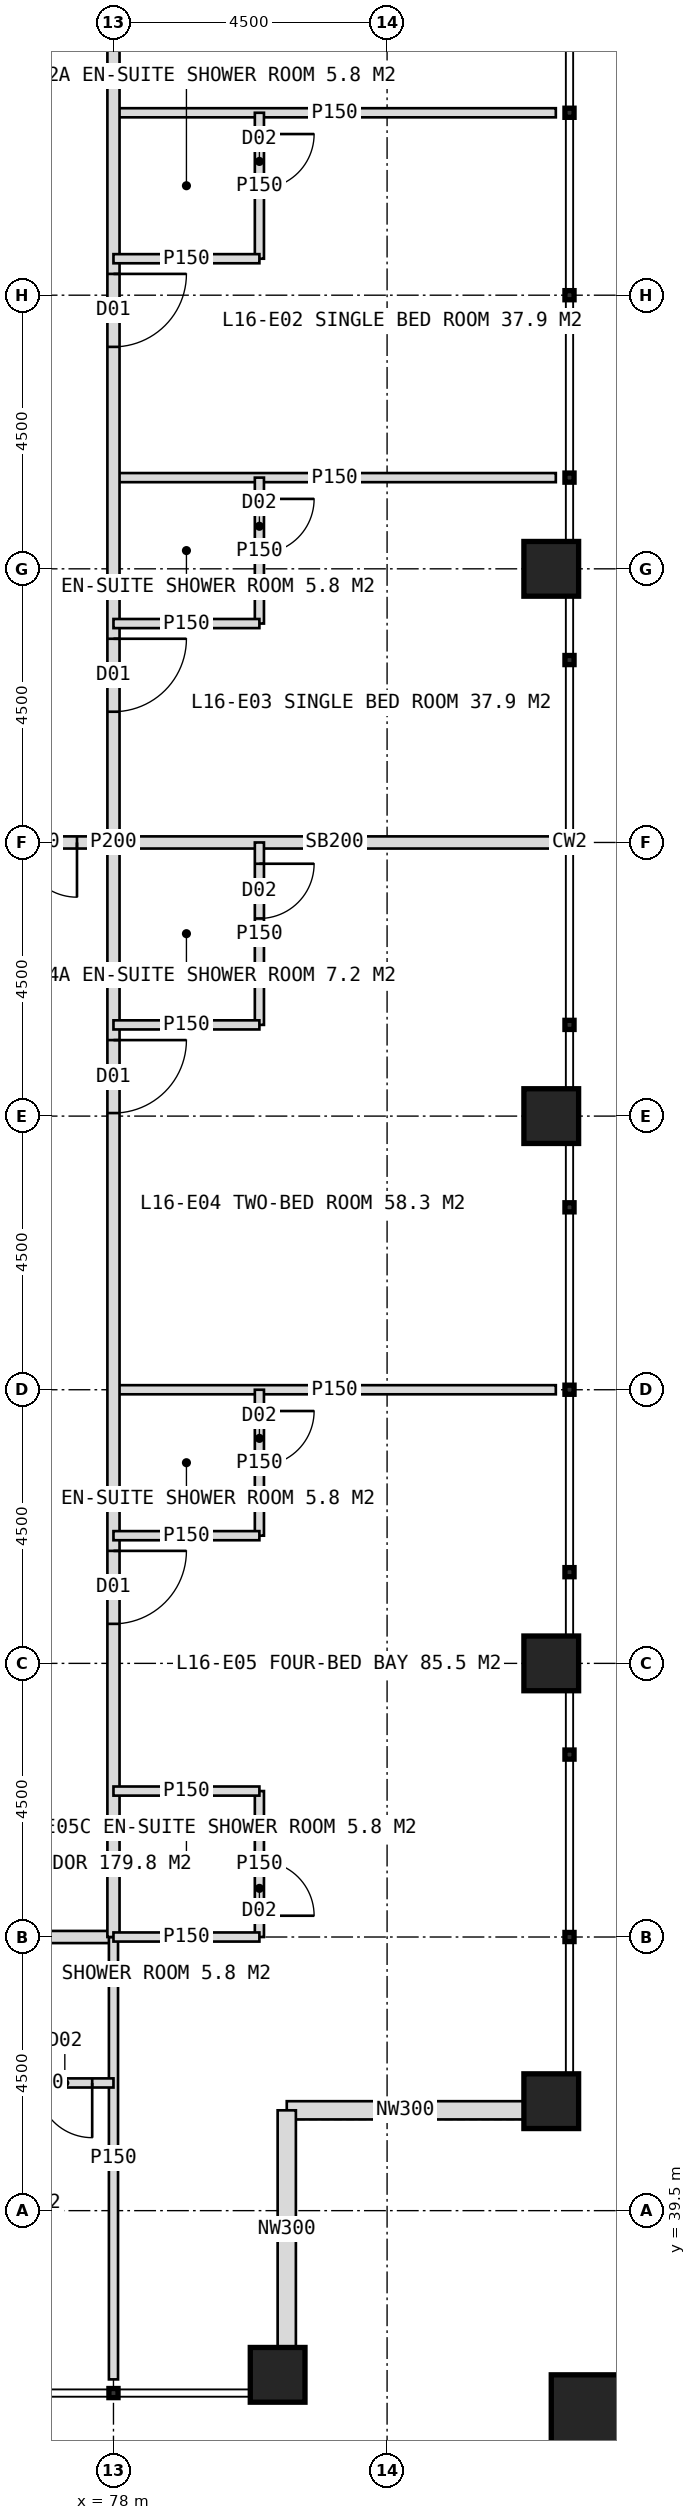
"""IFC4 building model, lengths in metres.
Left out: names, types, materials, properties, quantities, classifications, styles, units other than length and angle.
Written with IfcOpenShell. Run it as: python <this file> out.ifc"""

import sys

from ifc_helpers import new_model, si_unit, direction, frame, frame_2d, origin, origin_2d, place, context, subcontext, project, spatial, rectangle, hollow_rectangle, extrude, element, fill, save


model = new_model("IFC4")
c1 = context("Model", 3, precision=1e-05, world=origin(), true_north=direction((0.0, 1.0)))
c2 = subcontext(c1, "Body", "Model", "MODEL_VIEW")
j1 = project(units=[si_unit("LENGTHUNIT", "METRE"), si_unit("PLANEANGLEUNIT", "RADIAN")], contexts=[c1])
p1 = place(None, origin())
s1 = spatial("IfcSite", under=j1, at=p1, CompositionType="ELEMENT")
p2 = place(p1, origin())
s2 = spatial("IfcBuilding", under=s1, at=p2, CompositionType="ELEMENT")
p3 = place(p2, frame((0.0, 0.0, 71.0)))
s3 = spatial("IfcBuildingStorey", under=s2, at=p3, CompositionType="ELEMENT", Elevation=71.0)
for number, where, z_axis, x_axis in (
    (1, (85.2, 41.3, 0.0), (0.0, 0.0, 1.0), (1.0, 0.0, 0.0)),
    (2, (85.2, 48.5, 0.0), (0.0, 0.0, 1.0), (1.0, 0.0, 0.0)),
    (3, (85.2, 57.5, 0.0), (0.0, 0.0, 1.0), (1.0, 0.0, 0.0)),
    (4, (85.2, 66.5, 0.0), (0.0, 0.0, 1.0), (1.0, 0.0, 0.0)),
    (5, (80.7, 36.8, 0.0), (0.0, 0.0, 1.0), (1.0, 0.0, 0.0)),
):
    element("IfcColumn", number, at=place(p3, frame(where, z_axis=z_axis, x_axis=x_axis)), inside=s3, PredefinedType="COLUMN", context=c2, shape_type="SweptSolid", body=[
        extrude(hollow_rectangle(XDim=0.9, YDim=0.9, WallThickness=0.08, at=origin_2d()), origin(), (0.0, 0.0, 1.0), 4.0),
    ])
p4 = place(p3, frame((86.1, 35.9, 0.0), z_axis=(0.0, 0.0, 1.0), x_axis=(1.0, 0.0, 0.0)))
e6 = element("IfcColumn", 6, at=p4, inside=s3, PredefinedType="COLUMN", context=c2, shape_type="SweptSolid", body=[
    extrude(hollow_rectangle(XDim=1.8, YDim=1.8, WallThickness=0.1, at=origin_2d()), origin(), (0.0, 0.0, 1.0), 4.0),
])
for number, where, z_axis, x_axis in (
    (7, (84.75, 41.15, 0.0), (0.0, 0.0, 1.0), (-1.0, 0.0, 0.0)),
    (8, (80.85, 41.15, 0.0), (0.0, 0.0, 1.0), (0.0, -1.0, 0.0)),
):
    element("IfcWall", number, at=place(p3, frame(where, z_axis=z_axis, x_axis=x_axis)), inside=s3, PredefinedType="ELEMENTEDWALL", context=c2, shape_type="SweptSolid", body=[
        extrude(rectangle(XDim=3.9, YDim=0.3, at=frame_2d((1.95, 0.0))), origin(), (0.0, 0.0, 1.0), 2.95),
    ])
p5 = place(p3, frame((78.0, 44.0, 0.0), z_axis=(0.0, 0.0, 1.0), x_axis=(-1.0, 0.0, 0.0)))
e9 = element("IfcWall", 9, at=p5, inside=s3, PredefinedType="PARTITIONING", context=c2, shape_type="SweptSolid", body=[
    extrude(rectangle(XDim=36.0, YDim=0.2, at=frame_2d((18.0, 0.0))), origin(), (0.0, 0.0, 1.0), 3.75),
])
p6 = place(p5, frame((2.65, 0.0, 0.0)))
e10 = element("IfcOpeningElement", 10, at=p6, cuts=e9, PredefinedType="OPENING", context=c2, shape_type="SweptSolid", body=[
    extrude(rectangle(XDim=1.2, YDim=2.2, at=frame_2d((0.6, 1.1))), frame((0.0, 0.11, 0.0), z_axis=(0.0, -1.0, 0.0), x_axis=(1.0, 0.0, 0.0)), (0.0, 0.0, 1.0), 0.22),
])
p7 = place(p5, frame((8.65, 0.0, 0.0)))
e11 = element("IfcOpeningElement", 11, at=p7, cuts=e9, PredefinedType="OPENING", context=c2, shape_type="SweptSolid", body=[
    extrude(rectangle(XDim=1.2, YDim=2.2, at=frame_2d((0.6, 1.1))), frame((0.0, 0.11, 0.0), z_axis=(0.0, -1.0, 0.0), x_axis=(1.0, 0.0, 0.0)), (0.0, 0.0, 1.0), 0.22),
])
p8 = place(p5, frame((14.65, 0.0, 0.0)))
e12 = element("IfcOpeningElement", 12, at=p8, cuts=e9, PredefinedType="OPENING", context=c2, shape_type="SweptSolid", body=[
    extrude(rectangle(XDim=1.2, YDim=2.2, at=frame_2d((0.6, 1.1))), frame((0.0, 0.11, 0.0), z_axis=(0.0, -1.0, 0.0), x_axis=(1.0, 0.0, 0.0)), (0.0, 0.0, 1.0), 0.22),
])
p9 = place(p5, frame((21.25, 0.0, 0.0)))
e13 = element("IfcOpeningElement", 13, at=p9, cuts=e9, PredefinedType="OPENING", context=c2, shape_type="SweptSolid", body=[
    extrude(rectangle(XDim=1.2, YDim=2.2, at=frame_2d((0.6, 1.1))), frame((0.0, 0.11, 0.0), z_axis=(0.0, -1.0, 0.0), x_axis=(1.0, 0.0, 0.0)), (0.0, 0.0, 1.0), 0.22),
])
p10 = place(p5, frame((29.65, 0.0, 0.0)))
e14 = element("IfcOpeningElement", 14, at=p10, cuts=e9, PredefinedType="OPENING", context=c2, shape_type="SweptSolid", body=[
    extrude(rectangle(XDim=1.2, YDim=2.2, at=frame_2d((0.6, 1.1))), frame((0.0, 0.11, 0.0), z_axis=(0.0, -1.0, 0.0), x_axis=(1.0, 0.0, 0.0)), (0.0, 0.0, 1.0), 0.22),
])
p11 = place(p3, frame((78.0, 44.0, 0.0), z_axis=(0.0, 0.0, 1.0), x_axis=(0.0, -1.0, 0.0)))
e15 = element("IfcWall", 15, at=p11, inside=s3, PredefinedType="PARTITIONING", context=c2, shape_type="SweptSolid", body=[
    extrude(rectangle(XDim=7.275, YDim=0.15, at=frame_2d((3.637, 0.0))), origin(), (0.0, 0.0, 1.0), 3.75),
])
p12 = place(p3, frame((78.0, 41.6, 0.0), z_axis=(0.0, 0.0, 1.0), x_axis=(-1.0, 0.0, 0.0)))
e16 = element("IfcWall", 16, at=p12, inside=s3, PredefinedType="PARTITIONING", context=c2, shape_type="SweptSolid", body=[
    extrude(rectangle(XDim=2.4, YDim=0.15, at=frame_2d((1.2, 0.0))), origin(), (0.0, 0.0, 1.0), 3.75),
])
p13 = place(p12, frame((0.35, 0.0, 0.0)))
e17 = element("IfcOpeningElement", 17, at=p13, cuts=e16, PredefinedType="OPENING", context=c2, shape_type="SweptSolid", body=[
    extrude(rectangle(XDim=0.9, YDim=2.1, at=frame_2d((0.45, 1.05))), frame((0.0, 0.085, 0.0), z_axis=(0.0, -1.0, 0.0), x_axis=(1.0, 0.0, 0.0)), (0.0, 0.0, 1.0), 0.17),
])
for number, where, z_axis, x_axis in (
    (18, (78.0, 74.0, 0.0), (0.0, 0.0, 1.0), (1.0, 0.0, 0.0)),
    (19, (78.0, 68.0, 0.0), (0.0, 0.0, 1.0), (1.0, 0.0, 0.0)),
):
    element("IfcWall", number, at=place(p3, frame(where, z_axis=z_axis, x_axis=x_axis)), inside=s3, PredefinedType="PARTITIONING", context=c2, shape_type="SweptSolid", body=[
        extrude(rectangle(XDim=7.275, YDim=0.15, at=frame_2d((3.637, 0.0))), origin(), (0.0, 0.0, 1.0), 3.75),
    ])
p14 = place(p3, frame((78.0, 62.0, 0.0), z_axis=(0.0, 0.0, 1.0), x_axis=(1.0, 0.0, 0.0)))
e20 = element("IfcWall", 20, at=p14, inside=s3, PredefinedType="SOLIDWALL", context=c2, shape_type="SweptSolid", body=[
    extrude(rectangle(XDim=7.275, YDim=0.2, at=frame_2d((3.637, 0.0))), origin(), (0.0, 0.0, 1.0), 2.75),
])
p15 = place(p3, frame((78.0, 53.0, 0.0), z_axis=(0.0, 0.0, 1.0), x_axis=(1.0, 0.0, 0.0)))
e21 = element("IfcWall", 21, at=p15, inside=s3, PredefinedType="PARTITIONING", context=c2, shape_type="SweptSolid", body=[
    extrude(rectangle(XDim=7.275, YDim=0.15, at=frame_2d((3.637, 0.0))), origin(), (0.0, 0.0, 1.0), 3.75),
])
p16 = place(p3, frame((78.0, 80.0, 0.0), z_axis=(0.0, 0.0, 1.0), x_axis=(0.0, -1.0, 0.0)))
e22 = element("IfcWall", 22, at=p16, inside=s3, PredefinedType="PARTITIONING", context=c2, shape_type="SweptSolid", body=[
    extrude(rectangle(XDim=36.0, YDim=0.2, at=frame_2d((18.0, 0.0))), origin(), (0.0, 0.0, 1.0), 3.75),
])
p17 = place(p16, frame((2.65, 0.0, 0.0)))
e23 = element("IfcOpeningElement", 23, at=p17, cuts=e22, PredefinedType="OPENING", context=c2, shape_type="SweptSolid", body=[
    extrude(rectangle(XDim=1.2, YDim=2.2, at=frame_2d((0.6, 1.1))), frame((0.0, 0.11, 0.0), z_axis=(0.0, -1.0, 0.0), x_axis=(1.0, 0.0, 0.0)), (0.0, 0.0, 1.0), 0.22),
])
p18 = place(p16, frame((8.65, 0.0, 0.0)))
e24 = element("IfcOpeningElement", 24, at=p18, cuts=e22, PredefinedType="OPENING", context=c2, shape_type="SweptSolid", body=[
    extrude(rectangle(XDim=1.2, YDim=2.2, at=frame_2d((0.6, 1.1))), frame((0.0, 0.11, 0.0), z_axis=(0.0, -1.0, 0.0), x_axis=(1.0, 0.0, 0.0)), (0.0, 0.0, 1.0), 0.22),
])
p19 = place(p16, frame((14.65, 0.0, 0.0)))
e25 = element("IfcOpeningElement", 25, at=p19, cuts=e22, PredefinedType="OPENING", context=c2, shape_type="SweptSolid", body=[
    extrude(rectangle(XDim=1.2, YDim=2.2, at=frame_2d((0.6, 1.1))), frame((0.0, 0.11, 0.0), z_axis=(0.0, -1.0, 0.0), x_axis=(1.0, 0.0, 0.0)), (0.0, 0.0, 1.0), 0.22),
])
p20 = place(p16, frame((21.25, 0.0, 0.0)))
e26 = element("IfcOpeningElement", 26, at=p20, cuts=e22, PredefinedType="OPENING", context=c2, shape_type="SweptSolid", body=[
    extrude(rectangle(XDim=1.2, YDim=2.2, at=frame_2d((0.6, 1.1))), frame((0.0, 0.11, 0.0), z_axis=(0.0, -1.0, 0.0), x_axis=(1.0, 0.0, 0.0)), (0.0, 0.0, 1.0), 0.22),
])
p21 = place(p16, frame((29.65, 0.0, 0.0)))
e27 = element("IfcOpeningElement", 27, at=p21, cuts=e22, PredefinedType="OPENING", context=c2, shape_type="SweptSolid", body=[
    extrude(rectangle(XDim=1.2, YDim=2.2, at=frame_2d((0.6, 1.1))), frame((0.0, 0.11, 0.0), z_axis=(0.0, -1.0, 0.0), x_axis=(1.0, 0.0, 0.0)), (0.0, 0.0, 1.0), 0.22),
])
p22 = place(p3, frame((80.4, 74.0, 0.0), z_axis=(0.0, 0.0, 1.0), x_axis=(0.0, -1.0, 0.0)))
e28 = element("IfcWall", 28, at=p22, inside=s3, PredefinedType="PARTITIONING", context=c2, shape_type="SweptSolid", body=[
    extrude(rectangle(XDim=2.4, YDim=0.15, at=frame_2d((1.2, 0.0))), origin(), (0.0, 0.0, 1.0), 3.75),
])
p23 = place(p22, frame((0.35, 0.0, 0.0)))
e29 = element("IfcOpeningElement", 29, at=p23, cuts=e28, PredefinedType="OPENING", context=c2, shape_type="SweptSolid", body=[
    extrude(rectangle(XDim=0.9, YDim=2.1, at=frame_2d((0.45, 1.05))), frame((0.0, 0.085, 0.0), z_axis=(0.0, -1.0, 0.0), x_axis=(1.0, 0.0, 0.0)), (0.0, 0.0, 1.0), 0.17),
])
p24 = place(p3, frame((78.0, 71.6, 0.0), z_axis=(0.0, 0.0, 1.0), x_axis=(1.0, 0.0, 0.0)))
e30 = element("IfcWall", 30, at=p24, inside=s3, PredefinedType="PARTITIONING", context=c2, shape_type="SweptSolid", body=[
    extrude(rectangle(XDim=2.4, YDim=0.15, at=frame_2d((1.2, 0.0))), origin(), (0.0, 0.0, 1.0), 3.75),
])
p25 = place(p3, frame((80.4, 68.0, 0.0), z_axis=(0.0, 0.0, 1.0), x_axis=(0.0, -1.0, 0.0)))
e31 = element("IfcWall", 31, at=p25, inside=s3, PredefinedType="PARTITIONING", context=c2, shape_type="SweptSolid", body=[
    extrude(rectangle(XDim=2.4, YDim=0.15, at=frame_2d((1.2, 0.0))), origin(), (0.0, 0.0, 1.0), 3.75),
])
p26 = place(p25, frame((0.35, 0.0, 0.0)))
e32 = element("IfcOpeningElement", 32, at=p26, cuts=e31, PredefinedType="OPENING", context=c2, shape_type="SweptSolid", body=[
    extrude(rectangle(XDim=0.9, YDim=2.1, at=frame_2d((0.45, 1.05))), frame((0.0, 0.085, 0.0), z_axis=(0.0, -1.0, 0.0), x_axis=(1.0, 0.0, 0.0)), (0.0, 0.0, 1.0), 0.17),
])
p27 = place(p3, frame((78.0, 65.6, 0.0), z_axis=(0.0, 0.0, 1.0), x_axis=(1.0, 0.0, 0.0)))
e33 = element("IfcWall", 33, at=p27, inside=s3, PredefinedType="PARTITIONING", context=c2, shape_type="SweptSolid", body=[
    extrude(rectangle(XDim=2.4, YDim=0.15, at=frame_2d((1.2, 0.0))), origin(), (0.0, 0.0, 1.0), 3.75),
])
p28 = place(p3, frame((80.4, 62.0, 0.0), z_axis=(0.0, 0.0, 1.0), x_axis=(0.0, -1.0, 0.0)))
e34 = element("IfcWall", 34, at=p28, inside=s3, PredefinedType="PARTITIONING", context=c2, shape_type="SweptSolid", body=[
    extrude(rectangle(XDim=3.0, YDim=0.15, at=frame_2d((1.5, 0.0))), origin(), (0.0, 0.0, 1.0), 3.75),
])
p29 = place(p28, frame((0.35, 0.0, 0.0)))
e35 = element("IfcOpeningElement", 35, at=p29, cuts=e34, PredefinedType="OPENING", context=c2, shape_type="SweptSolid", body=[
    extrude(rectangle(XDim=0.9, YDim=2.1, at=frame_2d((0.45, 1.05))), frame((0.0, 0.085, 0.0), z_axis=(0.0, -1.0, 0.0), x_axis=(1.0, 0.0, 0.0)), (0.0, 0.0, 1.0), 0.17),
])
p30 = place(p3, frame((78.0, 59.0, 0.0), z_axis=(0.0, 0.0, 1.0), x_axis=(1.0, 0.0, 0.0)))
e36 = element("IfcWall", 36, at=p30, inside=s3, PredefinedType="PARTITIONING", context=c2, shape_type="SweptSolid", body=[
    extrude(rectangle(XDim=2.4, YDim=0.15, at=frame_2d((1.2, 0.0))), origin(), (0.0, 0.0, 1.0), 3.75),
])
p31 = place(p3, frame((80.4, 53.0, 0.0), z_axis=(0.0, 0.0, 1.0), x_axis=(0.0, -1.0, 0.0)))
e37 = element("IfcWall", 37, at=p31, inside=s3, PredefinedType="PARTITIONING", context=c2, shape_type="SweptSolid", body=[
    extrude(rectangle(XDim=2.4, YDim=0.15, at=frame_2d((1.2, 0.0))), origin(), (0.0, 0.0, 1.0), 3.75),
])
p32 = place(p31, frame((0.35, 0.0, 0.0)))
e38 = element("IfcOpeningElement", 38, at=p32, cuts=e37, PredefinedType="OPENING", context=c2, shape_type="SweptSolid", body=[
    extrude(rectangle(XDim=0.9, YDim=2.1, at=frame_2d((0.45, 1.05))), frame((0.0, 0.085, 0.0), z_axis=(0.0, -1.0, 0.0), x_axis=(1.0, 0.0, 0.0)), (0.0, 0.0, 1.0), 0.17),
])
p33 = place(p3, frame((78.0, 50.6, 0.0), z_axis=(0.0, 0.0, 1.0), x_axis=(1.0, 0.0, 0.0)))
e39 = element("IfcWall", 39, at=p33, inside=s3, PredefinedType="PARTITIONING", context=c2, shape_type="SweptSolid", body=[
    extrude(rectangle(XDim=2.4, YDim=0.15, at=frame_2d((1.2, 0.0))), origin(), (0.0, 0.0, 1.0), 3.75),
])
p34 = place(p3, frame((80.4, 46.4, 0.0), z_axis=(0.0, 0.0, 1.0), x_axis=(0.0, -1.0, 0.0)))
e40 = element("IfcWall", 40, at=p34, inside=s3, PredefinedType="PARTITIONING", context=c2, shape_type="SweptSolid", body=[
    extrude(rectangle(XDim=2.4, YDim=0.15, at=frame_2d((1.2, 0.0))), origin(), (0.0, 0.0, 1.0), 3.75),
])
p35 = place(p34, frame((1.15, 0.0, 0.0)))
e41 = element("IfcOpeningElement", 41, at=p35, cuts=e40, PredefinedType="OPENING", context=c2, shape_type="SweptSolid", body=[
    extrude(rectangle(XDim=0.9, YDim=2.1, at=frame_2d((0.45, 1.05))), frame((0.0, 0.085, 0.0), z_axis=(0.0, -1.0, 0.0), x_axis=(1.0, 0.0, 0.0)), (0.0, 0.0, 1.0), 0.17),
])
for number, where, z_axis, x_axis in (
    (42, (78.0, 46.4, 0.0), (0.0, 0.0, 1.0), (1.0, 0.0, 0.0)),
    (43, (78.0, 44.0, 0.0), (0.0, 0.0, 1.0), (1.0, 0.0, 0.0)),
):
    element("IfcWall", number, at=place(p3, frame(where, z_axis=z_axis, x_axis=x_axis)), inside=s3, PredefinedType="PARTITIONING", context=c2, shape_type="SweptSolid", body=[
        extrude(rectangle(XDim=2.4, YDim=0.15, at=frame_2d((1.2, 0.0))), origin(), (0.0, 0.0, 1.0), 3.75),
    ])
p36 = place(p3, frame((75.3, 62.0, 0.0), z_axis=(0.0, 0.0, 1.0), x_axis=(1.0, 0.0, 0.0)))
e44 = element("IfcWall", 44, at=p36, inside=s3, PredefinedType="SOLIDWALL", context=c2, shape_type="SweptSolid", body=[
    extrude(rectangle(XDim=2.7, YDim=0.2, at=frame_2d((1.35, 0.0))), origin(), (0.0, 0.0, 1.0), 2.75),
])
p37 = place(p36, frame((0.3, 0.0, 0.0)))
e45 = element("IfcOpeningElement", 45, at=p37, cuts=e44, PredefinedType="OPENING", context=c2, shape_type="SweptSolid", body=[
    extrude(rectangle(XDim=1.8, YDim=2.2, at=frame_2d((0.9, 1.1))), frame((0.0, 0.11, 0.0), z_axis=(0.0, -1.0, 0.0), x_axis=(1.0, 0.0, 0.0)), (0.0, 0.0, 1.0), 0.22),
])
p38 = place(p13, origin())
e46 = element("IfcDoor", 46, at=p38, inside=s3, OperationType="SINGLE_SWING_LEFT", PredefinedType="DOOR", context=c2, shape_type="SweptSolid", body=[
    extrude(rectangle(XDim=0.9, YDim=2.1, at=frame_2d((0.45, 1.05))), frame((0.0, 0.025, 0.0), z_axis=(0.0, -1.0, 0.0), x_axis=(1.0, 0.0, 0.0)), (0.0, 0.0, 1.0), 0.05),
])
fill(e17, e46)
p39 = place(p18, origin())
e47 = element("IfcDoor", 47, at=p39, inside=s3, OperationType="SINGLE_SWING_LEFT", PredefinedType="DOOR", context=c2, shape_type="SweptSolid", body=[
    extrude(rectangle(XDim=1.2, YDim=2.2, at=frame_2d((0.6, 1.1))), frame((0.0, 0.025, 0.0), z_axis=(0.0, -1.0, 0.0), x_axis=(1.0, 0.0, 0.0)), (0.0, 0.0, 1.0), 0.05),
])
fill(e24, e47)
p40 = place(p23, origin())
e48 = element("IfcDoor", 48, at=p40, inside=s3, OperationType="SINGLE_SWING_LEFT", PredefinedType="DOOR", context=c2, shape_type="SweptSolid", body=[
    extrude(rectangle(XDim=0.9, YDim=2.1, at=frame_2d((0.45, 1.05))), frame((0.0, 0.025, 0.0), z_axis=(0.0, -1.0, 0.0), x_axis=(1.0, 0.0, 0.0)), (0.0, 0.0, 1.0), 0.05),
])
fill(e29, e48)
p41 = place(p19, origin())
e49 = element("IfcDoor", 49, at=p41, inside=s3, OperationType="SINGLE_SWING_LEFT", PredefinedType="DOOR", context=c2, shape_type="SweptSolid", body=[
    extrude(rectangle(XDim=1.2, YDim=2.2, at=frame_2d((0.6, 1.1))), frame((0.0, 0.025, 0.0), z_axis=(0.0, -1.0, 0.0), x_axis=(1.0, 0.0, 0.0)), (0.0, 0.0, 1.0), 0.05),
])
fill(e25, e49)
p42 = place(p26, origin())
e50 = element("IfcDoor", 50, at=p42, inside=s3, OperationType="SINGLE_SWING_LEFT", PredefinedType="DOOR", context=c2, shape_type="SweptSolid", body=[
    extrude(rectangle(XDim=0.9, YDim=2.1, at=frame_2d((0.45, 1.05))), frame((0.0, 0.025, 0.0), z_axis=(0.0, -1.0, 0.0), x_axis=(1.0, 0.0, 0.0)), (0.0, 0.0, 1.0), 0.05),
])
fill(e32, e50)
p43 = place(p20, origin())
e51 = element("IfcDoor", 51, at=p43, inside=s3, OperationType="SINGLE_SWING_LEFT", PredefinedType="DOOR", context=c2, shape_type="SweptSolid", body=[
    extrude(rectangle(XDim=1.2, YDim=2.2, at=frame_2d((0.6, 1.1))), frame((0.0, 0.025, 0.0), z_axis=(0.0, -1.0, 0.0), x_axis=(1.0, 0.0, 0.0)), (0.0, 0.0, 1.0), 0.05),
])
fill(e26, e51)
p44 = place(p29, origin())
e52 = element("IfcDoor", 52, at=p44, inside=s3, OperationType="SINGLE_SWING_LEFT", PredefinedType="DOOR", context=c2, shape_type="SweptSolid", body=[
    extrude(rectangle(XDim=0.9, YDim=2.1, at=frame_2d((0.45, 1.05))), frame((0.0, 0.025, 0.0), z_axis=(0.0, -1.0, 0.0), x_axis=(1.0, 0.0, 0.0)), (0.0, 0.0, 1.0), 0.05),
])
fill(e35, e52)
p45 = place(p21, origin())
e53 = element("IfcDoor", 53, at=p45, inside=s3, OperationType="SINGLE_SWING_LEFT", PredefinedType="DOOR", context=c2, shape_type="SweptSolid", body=[
    extrude(rectangle(XDim=1.2, YDim=2.2, at=frame_2d((0.6, 1.1))), frame((0.0, 0.025, 0.0), z_axis=(0.0, -1.0, 0.0), x_axis=(1.0, 0.0, 0.0)), (0.0, 0.0, 1.0), 0.05),
])
fill(e27, e53)
p46 = place(p32, origin())
e54 = element("IfcDoor", 54, at=p46, inside=s3, OperationType="SINGLE_SWING_LEFT", PredefinedType="DOOR", context=c2, shape_type="SweptSolid", body=[
    extrude(rectangle(XDim=0.9, YDim=2.1, at=frame_2d((0.45, 1.05))), frame((0.0, 0.025, 0.0), z_axis=(0.0, -1.0, 0.0), x_axis=(1.0, 0.0, 0.0)), (0.0, 0.0, 1.0), 0.05),
])
fill(e38, e54)
p47 = place(p35, origin())
e55 = element("IfcDoor", 55, at=p47, inside=s3, OperationType="SINGLE_SWING_RIGHT", PredefinedType="DOOR", context=c2, shape_type="SweptSolid", body=[
    extrude(rectangle(XDim=0.9, YDim=2.1, at=frame_2d((0.45, 1.05))), frame((0.0, 0.025, 0.0), z_axis=(0.0, -1.0, 0.0), x_axis=(1.0, 0.0, 0.0)), (0.0, 0.0, 1.0), 0.05),
])
fill(e41, e55)
p48 = place(p37, origin())
e56 = element("IfcDoor", 56, at=p48, inside=s3, OperationType="DOUBLE_DOOR_DOUBLE_SWING", PredefinedType="DOOR", context=c2, shape_type="SweptSolid", body=[
    extrude(rectangle(XDim=1.8, YDim=2.2, at=frame_2d((0.9, 1.1))), frame((0.0, 0.025, 0.0), z_axis=(0.0, -1.0, 0.0), x_axis=(1.0, 0.0, 0.0)), (0.0, 0.0, 1.0), 0.05),
])
fill(e45, e56)
save(model, sys.argv[1])
